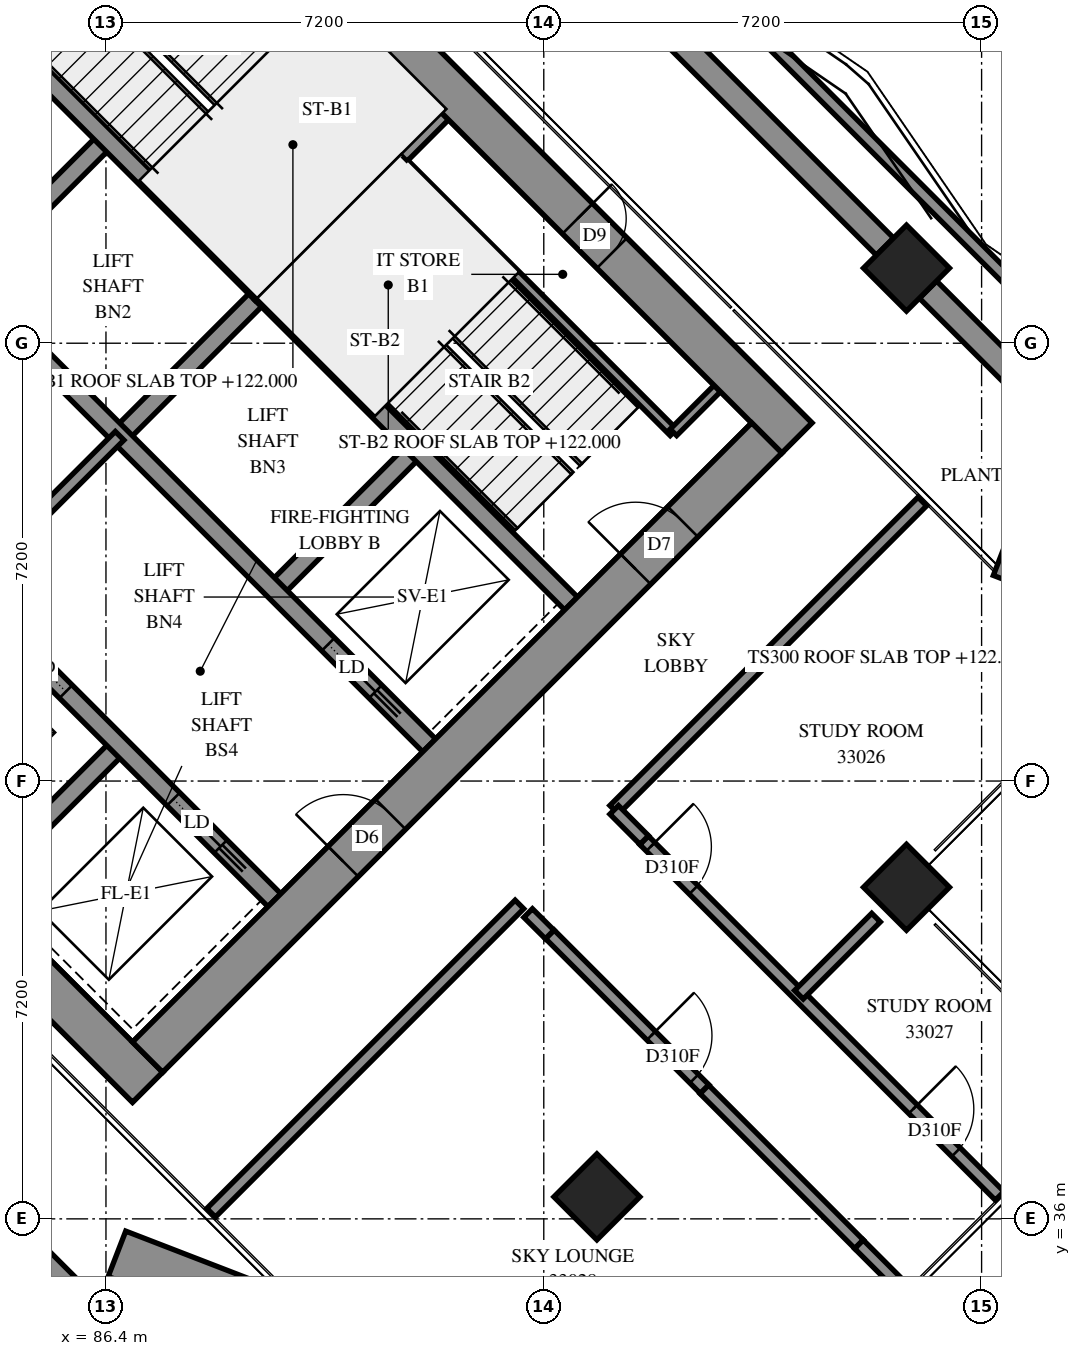
"""IFC4 building model, lengths in metres.
Left out: names, types, materials, properties, quantities, classifications, styles, units other than length and angle.
Written with IfcOpenShell. Run it as: python <this file> out.ifc"""

import sys

from ifc_helpers import new_model, si_unit, direction, frame, frame_2d, origin, origin_2d, place, context, subcontext, project, spatial, polyline, rectangle, outline, extrude, element, fill, save


model = new_model("IFC4")
c1 = context("Model", 3, precision=1e-05, world=origin(), true_north=direction((0.0, 1.0)))
c2 = subcontext(c1, "Body", "Model", "MODEL_VIEW")
j1 = project(units=[si_unit("LENGTHUNIT", "METRE"), si_unit("PLANEANGLEUNIT", "RADIAN")], contexts=[c1])
p1 = place(None, origin())
s1 = spatial("IfcSite", under=j1, at=p1, CompositionType="ELEMENT")
p2 = place(p1, origin())
s2 = spatial("IfcBuilding", under=s1, at=p2, CompositionType="ELEMENT")
p3 = place(p2, frame((0.0, 0.0, 122.0)))
s3 = spatial("IfcBuildingStorey", under=s2, at=p3, CompositionType="ELEMENT", Elevation=122.0)
for number, where, z_axis, x_axis in (
    (1, (99.565, 51.635, 0.0), (0.0, 0.0, 1.0), (0.707, -0.707, 0.0)),
    (2, (99.565, 41.453, 0.0), (0.0, 0.0, 1.0), (0.707, -0.707, 0.0)),
    (3, (94.474, 36.362, 0.0), (0.0, 0.0, 1.0), (0.707, -0.707, 0.0)),
):
    element("IfcColumn", number, at=place(p3, frame(where, z_axis=z_axis, x_axis=x_axis)), inside=s3, PredefinedType="COLUMN", context=c2, shape_type="SweptSolid", body=[
        extrude(rectangle(XDim=1.0, YDim=1.0, at=origin_2d()), origin(), (0.0, 0.0, 1.0), 3.9),
    ])
p4 = place(p3, frame((75.912, 49.337, -0.3), z_axis=(0.0, 0.0, 1.0), x_axis=(0.7071036166, -0.7071099457, 0.0)))
e4 = element("IfcWall", 4, at=p4, inside=s3, PredefinedType="SHEAR", context=c2, shape_type="SweptSolid", body=[
    extrude(rectangle(XDim=15.8, YDim=0.7, at=frame_2d((7.9, 0.0))), origin(), (0.0, 0.0, 1.0), 3.5),
])
p5 = place(p3, frame((86.589, 60.014, -0.3), z_axis=(0.0, 0.0, 1.0), x_axis=(0.7071099457, -0.7071036166, 0.0)))
e5 = element("IfcWall", 5, at=p5, inside=s3, PredefinedType="SHEAR", context=c2, shape_type="SweptSolid", body=[
    extrude(rectangle(XDim=15.8, YDim=0.7, at=frame_2d((7.9, 0.0))), origin(), (0.0, 0.0, 1.0), 3.5),
])
p6 = place(p5, frame((10.7, 0.0, 0.3)))
e6 = element("IfcOpeningElement", 6, at=p6, cuts=e5, PredefinedType="OPENING", context=c2, shape_type="SweptSolid", body=[
    extrude(rectangle(XDim=0.8, YDim=2.1, at=frame_2d((0.4, 1.05))), frame((0.0, 0.36, 0.0), z_axis=(0.0, -1.0, 0.0), x_axis=(1.0, 0.0, 0.0)), (0.0, 0.0, 1.0), 0.72),
])
p7 = place(p3, frame((76.407, 49.337, -0.3), z_axis=(0.0, 0.0, 1.0), x_axis=(0.7071067812, 0.7071067812, 0.0)))
e7 = element("IfcWall", 7, at=p7, inside=s3, PredefinedType="SHEAR", context=c2, shape_type="SweptSolid", body=[
    extrude(rectangle(XDim=14.4, YDim=0.7, at=frame_2d((7.2, 0.0))), origin(), (0.0, 0.0, 1.0), 3.5),
])
p8 = place(p7, frame((4.55, 0.0, 0.3)))
e8 = element("IfcOpeningElement", 8, at=p8, cuts=e7, PredefinedType="OPENING", context=c2, shape_type="SweptSolid", body=[
    extrude(rectangle(XDim=1.1, YDim=2.1, at=frame_2d((0.55, 1.05))), frame((0.0, 0.36, 0.0), z_axis=(0.0, -1.0, 0.0), x_axis=(1.0, 0.0, 0.0)), (0.0, 0.0, 1.0), 0.72),
])
p9 = place(p7, frame((11.35, 0.0, 0.3)))
e9 = element("IfcOpeningElement", 9, at=p9, cuts=e7, PredefinedType="OPENING", context=c2, shape_type="SweptSolid", body=[
    extrude(rectangle(XDim=1.1, YDim=2.1, at=frame_2d((0.55, 1.05))), frame((0.0, 0.36, 0.0), z_axis=(0.0, -1.0, 0.0), x_axis=(1.0, 0.0, 0.0)), (0.0, 0.0, 1.0), 0.72),
])
p10 = place(p3, frame((87.084, 38.66, -0.3), z_axis=(0.0, 0.0, 1.0), x_axis=(0.7071067812, 0.7071067812, 0.0)))
e10 = element("IfcWall", 10, at=p10, inside=s3, PredefinedType="SHEAR", context=c2, shape_type="SweptSolid", body=[
    extrude(rectangle(XDim=14.4, YDim=0.7, at=frame_2d((7.2, 0.0))), origin(), (0.0, 0.0, 1.0), 3.5),
])
p11 = place(p10, frame((4.55, 0.0, 0.3)))
e11 = element("IfcOpeningElement", 11, at=p11, cuts=e10, PredefinedType="OPENING", context=c2, shape_type="SweptSolid", body=[
    extrude(rectangle(XDim=1.1, YDim=2.1, at=frame_2d((0.55, 1.05))), frame((0.0, 0.36, 0.0), z_axis=(0.0, -1.0, 0.0), x_axis=(1.0, 0.0, 0.0)), (0.0, 0.0, 1.0), 0.72),
])
p12 = place(p10, frame((11.35, 0.0, 0.3)))
e12 = element("IfcOpeningElement", 12, at=p12, cuts=e10, PredefinedType="OPENING", context=c2, shape_type="SweptSolid", body=[
    extrude(rectangle(XDim=1.1, YDim=2.1, at=frame_2d((0.55, 1.05))), frame((0.0, 0.36, 0.0), z_axis=(0.0, -1.0, 0.0), x_axis=(1.0, 0.0, 0.0)), (0.0, 0.0, 1.0), 0.72),
])
p13 = place(p3, frame((84.079, 51.423, 0.0), z_axis=(0.0, 0.0, 1.0), x_axis=(0.7071219326, 0.7070916295, 0.0)))
e13 = element("IfcWall", 13, at=p13, inside=s3, PredefinedType="SOLIDWALL", context=c2, shape_type="SweptSolid", body=[
    extrude(rectangle(XDim=3.3, YDim=0.3, at=frame_2d((1.65, 0.0))), origin(), (0.0, 0.0, 1.0), 3.9),
])
p14 = place(p3, frame((86.625, 48.878, 0.0), z_axis=(0.0, 0.0, 1.0), x_axis=(0.7071067812, 0.7071067812, 0.0)))
e14 = element("IfcWall", 14, at=p14, inside=s3, PredefinedType="SOLIDWALL", context=c2, shape_type="SweptSolid", body=[
    extrude(rectangle(XDim=3.3, YDim=0.3, at=frame_2d((1.65, 0.0))), origin(), (0.0, 0.0, 1.0), 3.9),
])
p15 = place(p3, frame((84.291, 41.453, 0.0), z_axis=(0.0, 0.0, 1.0), x_axis=(0.7071067812, 0.7071067812, 0.0)))
e15 = element("IfcWall", 15, at=p15, inside=s3, PredefinedType="SOLIDWALL", context=c2, shape_type="SweptSolid", body=[
    extrude(rectangle(XDim=3.3, YDim=0.3, at=frame_2d((1.65, 0.0))), origin(), (0.0, 0.0, 1.0), 3.9),
])
p16 = place(p3, frame((89.17, 46.332, 0.0), z_axis=(0.0, 0.0, 1.0), x_axis=(0.7071067812, 0.7071067812, 0.0)))
e16 = element("IfcWall", 16, at=p16, inside=s3, PredefinedType="SOLIDWALL", context=c2, shape_type="SweptSolid", body=[
    extrude(rectangle(XDim=3.3, YDim=0.3, at=frame_2d((1.65, 0.0))), origin(), (0.0, 0.0, 1.0), 3.9),
])
p17 = place(p3, frame((78.988, 51.423, 0.0), z_axis=(0.0, 0.0, 1.0), x_axis=(0.7071067812, -0.7071067812, 0.0)))
e17 = element("IfcWall", 17, at=p17, inside=s3, PredefinedType="SOLIDWALL", context=c2, shape_type="SweptSolid", body=[
    extrude(rectangle(XDim=14.4, YDim=0.3, at=frame_2d((7.2, 0.0))), origin(), (0.0, 0.0, 1.0), 3.9),
])
p18 = place(p17, frame((1.25, 0.0, 0.0)))
e18 = element("IfcOpeningElement", 18, at=p18, cuts=e17, PredefinedType="OPENING", context=c2, shape_type="SweptSolid", body=[
    extrude(rectangle(XDim=1.1, YDim=2.1, at=frame_2d((0.55, 1.05))), frame((0.0, 0.16, 0.0), z_axis=(0.0, -1.0, 0.0), x_axis=(1.0, 0.0, 0.0)), (0.0, 0.0, 1.0), 0.32),
])
p19 = place(p17, frame((4.85, 0.0, 0.0)))
e19 = element("IfcOpeningElement", 19, at=p19, cuts=e17, PredefinedType="OPENING", context=c2, shape_type="SweptSolid", body=[
    extrude(rectangle(XDim=1.1, YDim=2.1, at=frame_2d((0.55, 1.05))), frame((0.0, 0.16, 0.0), z_axis=(0.0, -1.0, 0.0), x_axis=(1.0, 0.0, 0.0)), (0.0, 0.0, 1.0), 0.32),
])
p20 = place(p17, frame((8.45, 0.0, 0.0)))
e20 = element("IfcOpeningElement", 20, at=p20, cuts=e17, PredefinedType="OPENING", context=c2, shape_type="SweptSolid", body=[
    extrude(rectangle(XDim=1.1, YDim=2.1, at=frame_2d((0.55, 1.05))), frame((0.0, 0.16, 0.0), z_axis=(0.0, -1.0, 0.0), x_axis=(1.0, 0.0, 0.0)), (0.0, 0.0, 1.0), 0.32),
])
p21 = place(p17, frame((12.05, 0.0, 0.0)))
e21 = element("IfcOpeningElement", 21, at=p21, cuts=e17, PredefinedType="OPENING", context=c2, shape_type="SweptSolid", body=[
    extrude(rectangle(XDim=1.1, YDim=2.1, at=frame_2d((0.55, 1.05))), frame((0.0, 0.16, 0.0), z_axis=(0.0, -1.0, 0.0), x_axis=(1.0, 0.0, 0.0)), (0.0, 0.0, 1.0), 0.32),
])
p22 = place(p3, frame((81.534, 53.969, 0.0), z_axis=(0.0, 0.0, 1.0), x_axis=(0.707103309, -0.7071102534, 0.0)))
e22 = element("IfcWall", 22, at=p22, inside=s3, PredefinedType="SOLIDWALL", context=c2, shape_type="SweptSolid", body=[
    extrude(rectangle(XDim=14.4, YDim=0.3, at=frame_2d((7.2, 0.0))), origin(), (0.0, 0.0, 1.0), 3.9),
])
p23 = place(p22, frame((12.05, 0.0, 0.0)))
e23 = element("IfcOpeningElement", 23, at=p23, cuts=e22, PredefinedType="OPENING", context=c2, shape_type="SweptSolid", body=[
    extrude(rectangle(XDim=1.1, YDim=2.1, at=frame_2d((0.55, 1.05))), frame((0.0, 0.16, 0.0), z_axis=(0.0, -1.0, 0.0), x_axis=(1.0, 0.0, 0.0)), (0.0, 0.0, 1.0), 0.32),
])
for number, where, z_axis, x_axis in (
    (24, (83.867, 56.302, 0.0), (0.0, 0.0, 1.0), (0.707, -0.707, 0.0)),
    (25, (88.958, 51.211, 0.0), (0.0, 0.0, 1.0), (0.707, -0.707, 0.0)),
):
    element("IfcWall", number, at=place(p3, frame(where, z_axis=z_axis, x_axis=x_axis)), inside=s3, PredefinedType="SOLIDWALL", context=c2, shape_type="SweptSolid", body=[
        extrude(rectangle(XDim=7.2, YDim=0.3, at=frame_2d((3.6, 0.0))), origin(), (0.0, 0.0, 1.0), 3.9),
    ])
p24 = place(p3, frame((88.958, 51.211, 0.0), z_axis=(0.0, 0.0, 1.0), x_axis=(0.7071067812, 0.7071067812, 0.0)))
e26 = element("IfcWall", 26, at=p24, inside=s3, PredefinedType="SOLIDWALL", context=c2, shape_type="SweptSolid", body=[
    extrude(rectangle(XDim=4.2, YDim=0.3, at=frame_2d((2.1, 0.0))), origin(), (0.0, 0.0, 1.0), 3.9),
])
p25 = place(p3, frame((102.556, 46.407, 0.0), z_axis=(0.0, 0.0, 1.0), x_axis=(-0.9328142082, 0.3603576737, 0.0)))
e27 = element("IfcWall", 27, at=p25, inside=s3, PredefinedType="SOLIDWALL", context=c2, shape_type="SweptSolid", body=[
    extrude(rectangle(XDim=1.521, YDim=0.8, at=frame_2d((0.76, 0.0))), origin(), (0.0, 0.0, 1.0), 0.65),
])
p26 = place(p3, frame((97.465, 31.221, 0.0), z_axis=(0.0, 0.0, 1.0), x_axis=(-0.9328069089, 0.360376568, 0.0)))
e28 = element("IfcWall", 28, at=p26, inside=s3, PredefinedType="SOLIDWALL", context=c2, shape_type="SweptSolid", body=[
    extrude(rectangle(XDim=11.668, YDim=0.8, at=frame_2d((5.834, 0.0))), origin(), (0.0, 0.0, 1.0), 0.65),
])
p27 = place(p3, frame((107.838, 44.847, 0.0), z_axis=(0.0, 0.0, 1.0), x_axis=(-0.7071067812, 0.7071067812, 0.0)))
e29 = element("IfcWall", 29, at=p27, inside=s3, PredefinedType="SOLIDWALL", context=c2, shape_type="SweptSolid", body=[
    extrude(outline(polyline([(-0.1, -0.1), (39.926, -0.1), (39.843, 0.1), (0.1, 0.1), (-0.1, -0.1)])), origin(), (0.0, 0.0, 1.0), 4.2),
])
p28 = place(p3, frame((77.018, 42.15, 0.0), z_axis=(0.0, 0.0, 1.0), x_axis=(0.7071067812, -0.7071067812, 0.0)))
e30 = element("IfcWall", 30, at=p28, inside=s3, PredefinedType="SOLIDWALL", context=c2, shape_type="SweptSolid", body=[
    extrude(outline(polyline([(0.041, -0.1), (24.786, -0.1), (24.586, 0.1), (-0.041, 0.1), (0.041, -0.1)])), origin(), (0.0, 0.0, 1.0), 4.2),
])
p29 = place(p3, frame((94.474, 24.695, 0.0), z_axis=(0.0, 0.0, 1.0), x_axis=(0.7071067812, 0.7071067812, 0.0)))
e31 = element("IfcWall", 31, at=p29, inside=s3, PredefinedType="SOLIDWALL", context=c2, shape_type="SweptSolid", body=[
    extrude(outline(polyline([(-0.1, -0.1), (19.0, -0.1), (18.8, 0.1), (0.1, 0.1), (-0.1, -0.1)])), origin(), (0.0, 0.0, 1.0), 4.2),
])
p30 = place(p3, frame((91.313, 53.354, 0.0), z_axis=(0.0, 0.0, 1.0), x_axis=(0.7071147811, -0.7070987812, 0.0)))
e32 = element("IfcWall", 32, at=p30, inside=s3, PredefinedType="PARTITIONING", context=c2, shape_type="SweptSolid", body=[
    extrude(rectangle(XDim=6.25, YDim=0.15, at=frame_2d((3.125, 0.0))), origin(), (0.0, 0.0, 1.0), 3.9),
])
p31 = place(p3, frame((95.732, 48.934, 0.0), z_axis=(0.0, 0.0, 1.0), x_axis=(0.7071067812, 0.7071067812, 0.0)))
e33 = element("IfcWall", 33, at=p31, inside=s3, PredefinedType="PARTITIONING", context=c2, shape_type="SweptSolid", body=[
    extrude(rectangle(XDim=1.02, YDim=0.15, at=frame_2d((0.51, 0.0))), origin(), (0.0, 0.0, 1.0), 3.9),
])
p32 = place(p3, frame((84.079, 46.332, 0.0), z_axis=(0.0, 0.0, 1.0), x_axis=(0.7071067812, 0.7071067812, 0.0)))
e34 = element("IfcWall", 34, at=p32, inside=s3, PredefinedType="PARTITIONING", context=c2, shape_type="SweptSolid", body=[
    extrude(rectangle(XDim=3.6, YDim=0.2, at=frame_2d((1.8, 0.0))), origin(), (0.0, 0.0, 1.0), 3.9),
])
p33 = place(p3, frame((95.249, 42.227, 0.0), z_axis=(0.0, 0.0, 1.0), x_axis=(0.7071067812, -0.7071067812, 0.0)))
e35 = element("IfcWall", 35, at=p33, inside=s3, PredefinedType="PARTITIONING", context=c2, shape_type="SweptSolid", body=[
    extrude(rectangle(XDim=8.27, YDim=0.2, at=frame_2d((4.135, 0.0))), origin(), (0.0, 0.0, 1.0), 3.9),
])
p34 = place(p33, frame((0.152, 0.0, 0.0)))
e36 = element("IfcOpeningElement", 36, at=p34, cuts=e35, PredefinedType="OPENING", context=c2, shape_type="SweptSolid", body=[
    extrude(rectangle(XDim=1.0, YDim=2.1, at=frame_2d((0.5, 1.05))), frame((0.0, 0.11, 0.0), z_axis=(0.0, -1.0, 0.0), x_axis=(1.0, 0.0, 0.0)), (0.0, 0.0, 1.0), 0.22),
])
p35 = place(p33, frame((6.255, 0.0, 0.0)))
e37 = element("IfcOpeningElement", 37, at=p35, cuts=e35, PredefinedType="OPENING", context=c2, shape_type="SweptSolid", body=[
    extrude(rectangle(XDim=1.0, YDim=2.1, at=frame_2d((0.5, 1.05))), frame((0.0, 0.11, 0.0), z_axis=(0.0, -1.0, 0.0), x_axis=(1.0, 0.0, 0.0)), (0.0, 0.0, 1.0), 0.22),
])
p36 = place(p3, frame((88.129, 36.1, 0.0), z_axis=(0.0, 0.0, 1.0), x_axis=(0.7071067812, 0.7071067812, 0.0)))
e38 = element("IfcWall", 38, at=p36, inside=s3, PredefinedType="PARTITIONING", context=c2, shape_type="SweptSolid", body=[
    extrude(rectangle(XDim=7.17, YDim=0.2, at=frame_2d((3.585, 0.0))), origin(), (0.0, 0.0, 1.0), 3.9),
])
p37 = place(p3, frame((94.757, 42.727, 0.0), z_axis=(0.0, 0.0, 1.0), x_axis=(0.7069672711, 0.7072462637, 0.0)))
e39 = element("IfcWall", 39, at=p37, inside=s3, PredefinedType="PARTITIONING", context=c2, shape_type="SweptSolid", body=[
    extrude(rectangle(XDim=7.169, YDim=0.2, at=frame_2d((3.584, 0.0))), origin(), (0.0, 0.0, 1.0), 3.9),
])
p38 = place(p3, frame((93.699, 40.679, 0.0), z_axis=(0.0, 0.0, 1.0), x_axis=(0.7071067812, -0.7071067812, 0.0)))
e40 = element("IfcWall", 40, at=p38, inside=s3, PredefinedType="PARTITIONING", context=c2, shape_type="SweptSolid", body=[
    extrude(rectangle(XDim=3.601, YDim=0.2, at=frame_2d((1.8, 0.0))), origin(), (0.0, 0.0, 1.0), 3.9),
])
p39 = place(p38, frame((2.357, 0.0, 0.0)))
e41 = element("IfcOpeningElement", 41, at=p39, cuts=e40, PredefinedType="OPENING", context=c2, shape_type="SweptSolid", body=[
    extrude(rectangle(XDim=1.0, YDim=2.1, at=frame_2d((0.5, 1.05))), frame((0.0, 0.11, 0.0), z_axis=(0.0, -1.0, 0.0), x_axis=(1.0, 0.0, 0.0)), (0.0, 0.0, 1.0), 0.22),
])
p40 = place(p3, frame((96.241, 38.129, 0.0), z_axis=(0.0, 0.0, 1.0), x_axis=(0.7068288851, -0.7073845681, 0.0)))
e42 = element("IfcWall", 42, at=p40, inside=s3, PredefinedType="PARTITIONING", context=c2, shape_type="SweptSolid", body=[
    extrude(rectangle(XDim=3.599, YDim=0.2, at=frame_2d((1.8, 0.0))), origin(), (0.0, 0.0, 1.0), 3.9),
])
p41 = place(p3, frame((97.796, 39.686, 0.0), z_axis=(0.0, 0.0, 1.0), x_axis=(0.7071067812, 0.7071067812, 0.0)))
e43 = element("IfcWall", 43, at=p41, inside=s3, PredefinedType="PARTITIONING", context=c2, shape_type="SweptSolid", body=[
    extrude(rectangle(XDim=1.793, YDim=0.2, at=frame_2d((0.897, 0.0))), origin(), (0.0, 0.0, 1.0), 3.9),
])
p42 = place(p3, frame((98.783, 35.581, 0.0), z_axis=(0.0, 0.0, 1.0), x_axis=(0.7071067812, -0.7071067812, 0.0)))
e44 = element("IfcWall", 44, at=p42, inside=s3, PredefinedType="PARTITIONING", context=c2, shape_type="SweptSolid", body=[
    extrude(rectangle(XDim=1.072, YDim=0.2, at=frame_2d((0.536, 0.0))), origin(), (0.0, 0.0, 1.0), 3.9),
])
p43 = place(p3, frame((94.758, 42.726, 0.0), z_axis=(0.0, 0.0, 1.0), x_axis=(0.7056768426, -0.7085338339, 0.0)))
e45 = element("IfcWall", 45, at=p43, inside=s3, PredefinedType="PARTITIONING", context=c2, shape_type="SweptSolid", body=[
    extrude(rectangle(XDim=0.7, YDim=0.2, at=frame_2d((0.35, 0.0))), origin(), (0.0, 0.0, 1.0), 3.9),
])
p44 = place(p3, frame((93.343, 41.029, 0.0), z_axis=(0.0, 0.0, 1.0), x_axis=(0.7091070712, -0.7051008166, 0.0)))
e46 = element("IfcWall", 46, at=p44, inside=s3, PredefinedType="PARTITIONING", context=c2, shape_type="SweptSolid", body=[
    extrude(rectangle(XDim=0.499, YDim=0.2, at=frame_2d((0.25, 0.0))), origin(), (0.0, 0.0, 1.0), 3.9),
])
p45 = place(p6, origin())
e47 = element("IfcDoor", 47, at=p45, inside=s3, OperationType="SINGLE_SWING_RIGHT", PredefinedType="DOOR", context=c2, shape_type="SweptSolid", body=[
    extrude(rectangle(XDim=0.8, YDim=2.1, at=frame_2d((0.4, 1.05))), frame((0.0, -0.29, 0.0), z_axis=(0.0, -1.0, 0.0), x_axis=(1.0, 0.0, 0.0)), (0.0, 0.0, 1.0), 0.05),
])
fill(e6, e47)
p46 = place(p11, origin())
e48 = element("IfcDoor", 48, at=p46, inside=s3, OperationType="DOUBLE_DOOR_SINGLE_SWING", PredefinedType="DOOR", context=c2, shape_type="SweptSolid", body=[
    extrude(rectangle(XDim=1.1, YDim=2.1, at=frame_2d((0.55, 1.05))), frame((0.0, 0.025, 0.0), z_axis=(0.0, -1.0, 0.0), x_axis=(1.0, 0.0, 0.0)), (0.0, 0.0, 1.0), 0.05),
])
fill(e11, e48)
p47 = place(p12, origin())
e49 = element("IfcDoor", 49, at=p47, inside=s3, OperationType="SINGLE_SWING_RIGHT", PredefinedType="DOOR", context=c2, shape_type="SweptSolid", body=[
    extrude(rectangle(XDim=1.1, YDim=2.1, at=frame_2d((0.55, 1.05))), frame((0.0, 0.025, 0.0), z_axis=(0.0, -1.0, 0.0), x_axis=(1.0, 0.0, 0.0)), (0.0, 0.0, 1.0), 0.05),
])
fill(e12, e49)
p48 = place(p20, origin())
e50 = element("IfcDoor", 50, at=p48, inside=s3, OperationType="SLIDING_TO_LEFT", PredefinedType="DOOR", context=c2, shape_type="SweptSolid", body=[
    extrude(rectangle(XDim=1.1, YDim=2.1, at=frame_2d((0.55, 1.05))), frame((0.0, 0.025, 0.0), z_axis=(0.0, -1.0, 0.0), x_axis=(1.0, 0.0, 0.0)), (0.0, 0.0, 1.0), 0.05),
])
fill(e20, e50)
p49 = place(p21, origin())
e51 = element("IfcDoor", 51, at=p49, inside=s3, OperationType="SLIDING_TO_RIGHT", PredefinedType="DOOR", context=c2, shape_type="SweptSolid", body=[
    extrude(rectangle(XDim=1.1, YDim=2.1, at=frame_2d((0.55, 1.05))), frame((0.0, 0.025, 0.0), z_axis=(0.0, -1.0, 0.0), x_axis=(1.0, 0.0, 0.0)), (0.0, 0.0, 1.0), 0.05),
])
fill(e21, e51)
p50 = place(p23, origin())
e52 = element("IfcDoor", 52, at=p50, inside=s3, OperationType="SLIDING_TO_RIGHT", PredefinedType="DOOR", context=c2, shape_type="SweptSolid", body=[
    extrude(rectangle(XDim=1.1, YDim=2.1, at=frame_2d((0.55, 1.05))), frame((0.0, 0.025, 0.0), z_axis=(0.0, -1.0, 0.0), x_axis=(1.0, 0.0, 0.0)), (0.0, 0.0, 1.0), 0.05),
])
fill(e23, e52)
p51 = place(p34, origin())
e53 = element("IfcDoor", 53, at=p51, inside=s3, OperationType="SINGLE_SWING_RIGHT", PredefinedType="DOOR", context=c2, shape_type="SweptSolid", body=[
    extrude(rectangle(XDim=1.0, YDim=2.1, at=frame_2d((0.5, 1.05))), frame((0.0, 0.025, 0.0), z_axis=(0.0, -1.0, 0.0), x_axis=(1.0, 0.0, 0.0)), (0.0, 0.0, 1.0), 0.05),
])
fill(e36, e53)
p52 = place(p35, origin())
e54 = element("IfcDoor", 54, at=p52, inside=s3, OperationType="SINGLE_SWING_LEFT", PredefinedType="DOOR", context=c2, shape_type="SweptSolid", body=[
    extrude(rectangle(XDim=1.0, YDim=2.1, at=frame_2d((0.5, 1.05))), frame((0.0, 0.025, 0.0), z_axis=(0.0, -1.0, 0.0), x_axis=(1.0, 0.0, 0.0)), (0.0, 0.0, 1.0), 0.05),
])
fill(e37, e54)
p53 = place(p39, origin())
e55 = element("IfcDoor", 55, at=p53, inside=s3, OperationType="SINGLE_SWING_LEFT", PredefinedType="DOOR", context=c2, shape_type="SweptSolid", body=[
    extrude(rectangle(XDim=1.0, YDim=2.1, at=frame_2d((0.5, 1.05))), frame((0.0, 0.025, 0.0), z_axis=(0.0, -1.0, 0.0), x_axis=(1.0, 0.0, 0.0)), (0.0, 0.0, 1.0), 0.05),
])
fill(e41, e55)
save(model, sys.argv[1])
